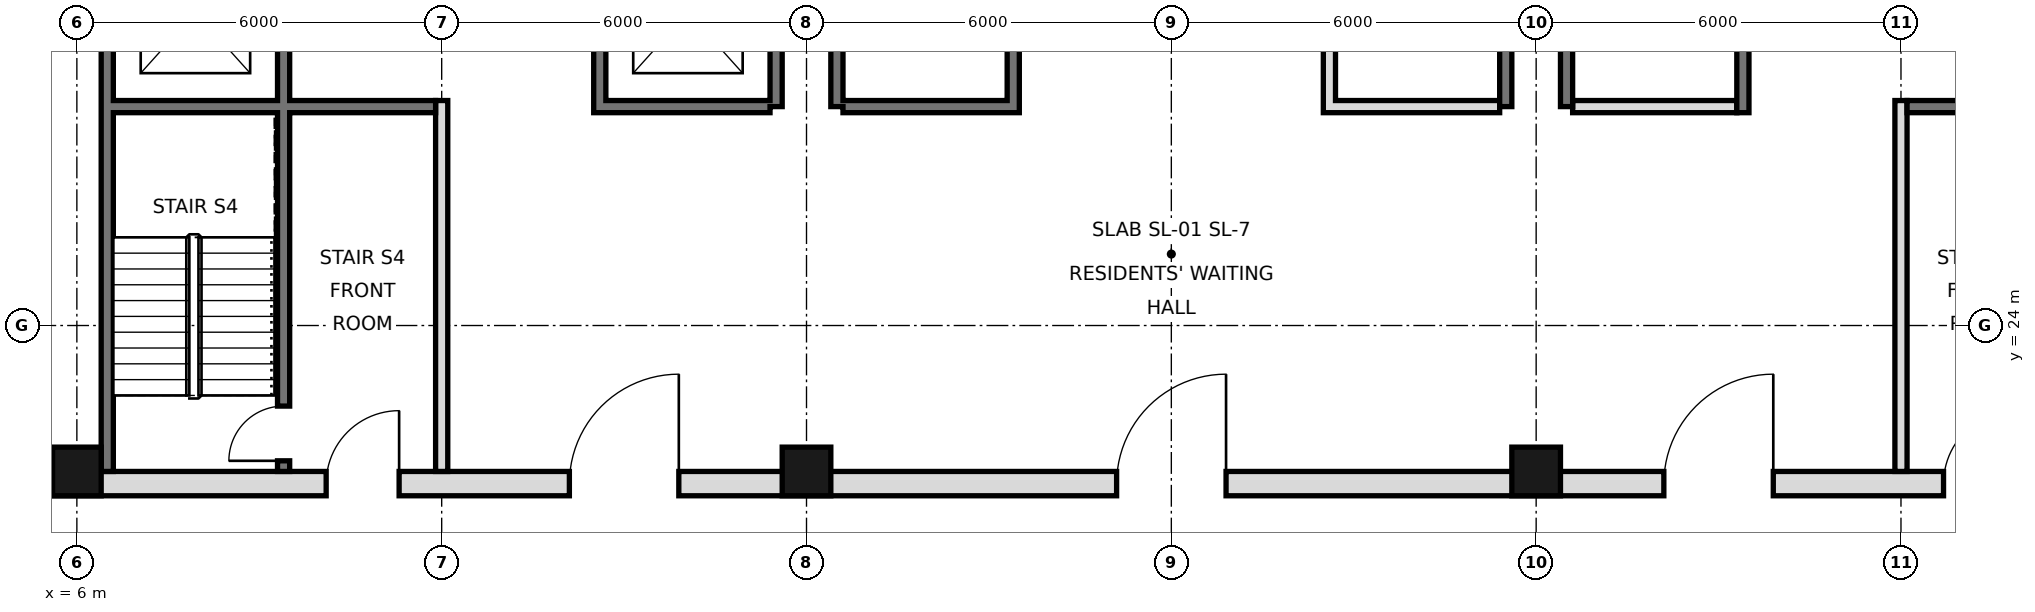
"""IFC4 building model, lengths in metres.
Left out: names, types, materials, properties, quantities, classifications, styles, units other than length and angle.
Written with IfcOpenShell. Run it as: python <this file> out.ifc"""

import sys

from ifc_helpers import new_model, si_unit, direction, frame, frame_2d, origin, origin_2d, place, context, subcontext, project, spatial, rectangle, hollow_rectangle, extrude, element, fill, save


model = new_model("IFC4")
c1 = context("Model", 3, precision=1e-05, world=origin(), true_north=direction((0.0, 1.0)))
c2 = subcontext(c1, "Body", "Model", "MODEL_VIEW")
j1 = project(units=[si_unit("LENGTHUNIT", "METRE"), si_unit("PLANEANGLEUNIT", "RADIAN")], contexts=[c1])
p1 = place(None, origin())
s1 = spatial("IfcSite", under=j1, at=p1, CompositionType="ELEMENT")
p2 = place(p1, origin())
s2 = spatial("IfcBuilding", under=s1, at=p2, CompositionType="ELEMENT")
p3 = place(p2, frame((0.0, 0.0, 154.6)))
s3 = spatial("IfcBuildingStorey", under=s2, at=p3, CompositionType="ELEMENT", Elevation=154.6)
for number, where, z_axis, x_axis in (
    (1, (6.0, 21.6, 0.0), (0.0, 0.0, 1.0), (1.0, 0.0, 0.0)),
    (2, (18.0, 21.6, 0.0), (0.0, 0.0, 1.0), (1.0, 0.0, 0.0)),
    (3, (30.0, 21.6, 0.0), (0.0, 0.0, 1.0), (1.0, 0.0, 0.0)),
):
    element("IfcColumn", number, at=place(p3, frame(where, z_axis=z_axis, x_axis=x_axis)), inside=s3, PredefinedType="COLUMN", context=c2, shape_type="SweptSolid", body=[
        extrude(hollow_rectangle(XDim=0.8, YDim=0.8, WallThickness=0.045, at=origin_2d()), origin(), (0.0, 0.0, 1.0), 3.6),
    ])
p4 = place(p3, frame((6.5, 21.6, 0.0), z_axis=(0.0, 0.0, 1.0), x_axis=(0.0, 1.0, 0.0)))
e4 = element("IfcWall", 4, at=p4, inside=s3, PredefinedType="SOLIDWALL", context=c2, shape_type="SweptSolid", body=[
    extrude(rectangle(XDim=23.5, YDim=0.2, at=frame_2d((11.75, 0.0))), origin(), (0.0, 0.0, 1.0), 3.42),
])
for number, where, z_axis, x_axis in (
    (5, (17.5, 27.6, 0.0), (0.0, 0.0, 1.0), (0.0, 1.0, 0.0)),
    (6, (18.5, 27.6, 0.0), (0.0, 0.0, 1.0), (0.0, 1.0, 0.0)),
    (7, (29.5, 27.6, 0.0), (0.0, 0.0, 1.0), (0.0, 1.0, 0.0)),
    (8, (30.5, 27.6, 0.0), (0.0, 0.0, 1.0), (0.0, 1.0, 0.0)),
):
    element("IfcWall", number, at=place(p3, frame(where, z_axis=z_axis, x_axis=x_axis)), inside=s3, PredefinedType="SOLIDWALL", context=c2, shape_type="SweptSolid", body=[
        extrude(rectangle(XDim=17.5, YDim=0.2, at=frame_2d((8.75, 0.0))), origin(), (0.0, 0.0, 1.0), 3.42),
    ])
p5 = place(p3, frame((5.6, 21.4, 0.0), z_axis=(0.0, 0.0, 1.0), x_axis=(1.0, 0.0, 0.0)))
e9 = element("IfcWall", 9, at=p5, inside=s3, PredefinedType="SOLIDWALL", context=c2, shape_type="SweptSolid", body=[
    extrude(rectangle(XDim=36.8, YDim=0.4, at=frame_2d((18.4, 0.0))), origin(), (0.0, 0.0, 1.0), 3.42),
])
p6 = place(p5, frame((8.5, 0.0, 0.0)))
e10 = element("IfcOpeningElement", 10, at=p6, cuts=e9, PredefinedType="OPENING", context=c2, shape_type="SweptSolid", body=[
    extrude(rectangle(XDim=1.8, YDim=2.1, at=frame_2d((0.9, 1.05))), frame((0.0, 0.21, 0.0), z_axis=(0.0, -1.0, 0.0), x_axis=(1.0, 0.0, 0.0)), (0.0, 0.0, 1.0), 0.42),
])
p7 = place(p5, frame((17.5, 0.0, 0.0)))
e11 = element("IfcOpeningElement", 11, at=p7, cuts=e9, PredefinedType="OPENING", context=c2, shape_type="SweptSolid", body=[
    extrude(rectangle(XDim=1.8, YDim=2.1, at=frame_2d((0.9, 1.05))), frame((0.0, 0.21, 0.0), z_axis=(0.0, -1.0, 0.0), x_axis=(1.0, 0.0, 0.0)), (0.0, 0.0, 1.0), 0.42),
])
p8 = place(p5, frame((26.5, 0.0, 0.0)))
e12 = element("IfcOpeningElement", 12, at=p8, cuts=e9, PredefinedType="OPENING", context=c2, shape_type="SweptSolid", body=[
    extrude(rectangle(XDim=1.8, YDim=2.1, at=frame_2d((0.9, 1.05))), frame((0.0, 0.21, 0.0), z_axis=(0.0, -1.0, 0.0), x_axis=(1.0, 0.0, 0.0)), (0.0, 0.0, 1.0), 0.42),
])
p9 = place(p5, frame((4.5, 0.0, 0.0)))
e13 = element("IfcOpeningElement", 13, at=p9, cuts=e9, PredefinedType="OPENING", context=c2, shape_type="SweptSolid", body=[
    extrude(rectangle(XDim=1.2, YDim=2.1, at=frame_2d((0.6, 1.05))), frame((0.0, 0.21, 0.0), z_axis=(0.0, -1.0, 0.0), x_axis=(1.0, 0.0, 0.0)), (0.0, 0.0, 1.0), 0.42),
])
p10 = place(p5, frame((31.1, 0.0, 0.0)))
e14 = element("IfcOpeningElement", 14, at=p10, cuts=e9, PredefinedType="OPENING", context=c2, shape_type="SweptSolid", body=[
    extrude(rectangle(XDim=1.2, YDim=2.1, at=frame_2d((0.6, 1.05))), frame((0.0, 0.21, 0.0), z_axis=(0.0, -1.0, 0.0), x_axis=(1.0, 0.0, 0.0)), (0.0, 0.0, 1.0), 0.42),
])
p11 = place(p3, frame((12.0, 21.6, 0.0), z_axis=(0.0, 0.0, 1.0), x_axis=(0.0, 1.0, 0.0)))
e15 = element("IfcWall", 15, at=p11, inside=s3, PredefinedType="PARTITIONING", context=c2, shape_type="SweptSolid", body=[
    extrude(rectangle(XDim=6.1, YDim=0.2, at=frame_2d((3.05, 0.0))), origin(), (0.0, 0.0, 1.0), 3.42),
])
p12 = place(p3, frame((14.6, 27.5, 0.0), z_axis=(0.0, 0.0, 1.0), x_axis=(0.0, 1.0, 0.0)))
e16 = element("IfcWall", 16, at=p12, inside=s3, PredefinedType="SOLIDWALL", context=c2, shape_type="SweptSolid", body=[
    extrude(rectangle(XDim=17.5, YDim=0.2, at=frame_2d((8.75, 0.0))), origin(), (0.0, 0.0, 1.0), 3.42),
])
p13 = place(p12, frame((1.1, 0.0, 0.0)))
e17 = element("IfcOpeningElement", 17, at=p13, cuts=e16, PredefinedType="OPENING", context=c2, shape_type="SweptSolid", body=[
    extrude(rectangle(XDim=1.1, YDim=2.1, at=frame_2d((0.55, 1.05))), frame((0.0, 0.11, 0.0), z_axis=(0.0, -1.0, 0.0), x_axis=(1.0, 0.0, 0.0)), (0.0, 0.0, 1.0), 0.22),
])
p14 = place(p12, frame((4.2, 0.0, 0.0)))
e18 = element("IfcOpeningElement", 18, at=p14, cuts=e16, PredefinedType="OPENING", context=c2, shape_type="SweptSolid", body=[
    extrude(rectangle(XDim=1.1, YDim=2.1, at=frame_2d((0.55, 1.05))), frame((0.0, 0.11, 0.0), z_axis=(0.0, -1.0, 0.0), x_axis=(1.0, 0.0, 0.0)), (0.0, 0.0, 1.0), 0.22),
])
p15 = place(p12, frame((15.4, 0.0, 0.0)))
e19 = element("IfcOpeningElement", 19, at=p15, cuts=e16, PredefinedType="OPENING", context=c2, shape_type="SweptSolid", body=[
    extrude(rectangle(XDim=1.1, YDim=2.1, at=frame_2d((0.55, 1.05))), frame((0.0, 0.11, 0.0), z_axis=(0.0, -1.0, 0.0), x_axis=(1.0, 0.0, 0.0)), (0.0, 0.0, 1.0), 0.22),
])
p16 = place(p12, frame((9.9, 0.0, 0.0)))
e20 = element("IfcOpeningElement", 20, at=p16, cuts=e16, PredefinedType="OPENING", context=c2, shape_type="SweptSolid", body=[
    extrude(rectangle(XDim=0.9, YDim=2.1, at=frame_2d((0.45, 1.05))), frame((0.0, 0.11, 0.0), z_axis=(0.0, -1.0, 0.0), x_axis=(1.0, 0.0, 0.0)), (0.0, 0.0, 1.0), 0.22),
])
p17 = place(p3, frame((21.4, 27.5, 0.0), z_axis=(0.0, 0.0, 1.0), x_axis=(0.0, 1.0, 0.0)))
e21 = element("IfcWall", 21, at=p17, inside=s3, PredefinedType="SOLIDWALL", context=c2, shape_type="SweptSolid", body=[
    extrude(rectangle(XDim=17.5, YDim=0.2, at=frame_2d((8.75, 0.0))), origin(), (0.0, 0.0, 1.0), 3.42),
])
p18 = place(p17, frame((9.8, 0.0, 0.0)))
e22 = element("IfcOpeningElement", 22, at=p18, cuts=e21, PredefinedType="OPENING", context=c2, shape_type="SweptSolid", body=[
    extrude(rectangle(XDim=1.0, YDim=2.1, at=frame_2d((0.5, 1.05))), frame((0.0, 0.11, 0.0), z_axis=(0.0, -1.0, 0.0), x_axis=(1.0, 0.0, 0.0)), (0.0, 0.0, 1.0), 0.22),
])
p19 = place(p17, frame((7.4, 0.0, 0.0)))
e23 = element("IfcOpeningElement", 23, at=p19, cuts=e21, PredefinedType="OPENING", context=c2, shape_type="SweptSolid", body=[
    extrude(rectangle(XDim=0.9, YDim=2.1, at=frame_2d((0.45, 1.05))), frame((0.0, 0.11, 0.0), z_axis=(0.0, -1.0, 0.0), x_axis=(1.0, 0.0, 0.0)), (0.0, 0.0, 1.0), 0.22),
])
p20 = place(p3, frame((26.6, 27.5, 0.0), z_axis=(0.0, 0.0, 1.0), x_axis=(0.0, 1.0, 0.0)))
e24 = element("IfcWall", 24, at=p20, inside=s3, PredefinedType="SOLIDWALL", context=c2, shape_type="SweptSolid", body=[
    extrude(rectangle(XDim=17.5, YDim=0.2, at=frame_2d((8.75, 0.0))), origin(), (0.0, 0.0, 1.0), 3.42),
])
p21 = place(p20, frame((4.3, 0.0, 0.0)))
e25 = element("IfcOpeningElement", 25, at=p21, cuts=e24, PredefinedType="OPENING", context=c2, shape_type="SweptSolid", body=[
    extrude(rectangle(XDim=0.9, YDim=2.1, at=frame_2d((0.45, 1.05))), frame((0.0, 0.11, 0.0), z_axis=(0.0, -1.0, 0.0), x_axis=(1.0, 0.0, 0.0)), (0.0, 0.0, 1.0), 0.22),
])
p22 = place(p20, frame((10.35, 0.0, 0.0)))
e26 = element("IfcOpeningElement", 26, at=p22, cuts=e24, PredefinedType="OPENING", context=c2, shape_type="SweptSolid", body=[
    extrude(rectangle(XDim=1.0, YDim=2.1, at=frame_2d((0.5, 1.05))), frame((0.0, 0.11, 0.0), z_axis=(0.0, -1.0, 0.0), x_axis=(1.0, 0.0, 0.0)), (0.0, 0.0, 1.0), 0.22),
])
p23 = place(p20, frame((14.575, 0.0, 0.0)))
e27 = element("IfcOpeningElement", 27, at=p23, cuts=e24, PredefinedType="OPENING", context=c2, shape_type="SweptSolid", body=[
    extrude(rectangle(XDim=1.0, YDim=2.1, at=frame_2d((0.5, 1.05))), frame((0.0, 0.11, 0.0), z_axis=(0.0, -1.0, 0.0), x_axis=(1.0, 0.0, 0.0)), (0.0, 0.0, 1.0), 0.22),
])
p24 = place(p3, frame((33.4, 27.5, 0.0), z_axis=(0.0, 0.0, 1.0), x_axis=(0.0, 1.0, 0.0)))
e28 = element("IfcWall", 28, at=p24, inside=s3, PredefinedType="SOLIDWALL", context=c2, shape_type="SweptSolid", body=[
    extrude(rectangle(XDim=17.5, YDim=0.2, at=frame_2d((8.75, 0.0))), origin(), (0.0, 0.0, 1.0), 3.42),
])
p25 = place(p24, frame((15.4, 0.0, 0.0)))
e29 = element("IfcOpeningElement", 29, at=p25, cuts=e28, PredefinedType="OPENING", context=c2, shape_type="SweptSolid", body=[
    extrude(rectangle(XDim=1.1, YDim=2.1, at=frame_2d((0.55, 1.05))), frame((0.0, 0.11, 0.0), z_axis=(0.0, -1.0, 0.0), x_axis=(1.0, 0.0, 0.0)), (0.0, 0.0, 1.0), 0.22),
])
p26 = place(p24, frame((2.7, 0.0, 0.0)))
e30 = element("IfcOpeningElement", 30, at=p26, cuts=e28, PredefinedType="OPENING", context=c2, shape_type="SweptSolid", body=[
    extrude(rectangle(XDim=1.0, YDim=2.1, at=frame_2d((0.5, 1.05))), frame((0.0, 0.11, 0.0), z_axis=(0.0, -1.0, 0.0), x_axis=(1.0, 0.0, 0.0)), (0.0, 0.0, 1.0), 0.22),
])
p27 = place(p24, frame((9.9, 0.0, 0.0)))
e31 = element("IfcOpeningElement", 31, at=p27, cuts=e28, PredefinedType="OPENING", context=c2, shape_type="SweptSolid", body=[
    extrude(rectangle(XDim=0.9, YDim=2.1, at=frame_2d((0.45, 1.05))), frame((0.0, 0.11, 0.0), z_axis=(0.0, -1.0, 0.0), x_axis=(1.0, 0.0, 0.0)), (0.0, 0.0, 1.0), 0.22),
])
p28 = place(p3, frame((36.0, 21.6, 0.0), z_axis=(0.0, 0.0, 1.0), x_axis=(0.0, 1.0, 0.0)))
e32 = element("IfcWall", 32, at=p28, inside=s3, PredefinedType="PARTITIONING", context=c2, shape_type="SweptSolid", body=[
    extrude(rectangle(XDim=6.1, YDim=0.2, at=frame_2d((3.05, 0.0))), origin(), (0.0, 0.0, 1.0), 3.42),
])
p29 = place(p3, frame((9.4, 21.6, 0.0), z_axis=(0.0, 0.0, 1.0), x_axis=(0.0, 1.0, 0.0)))
e33 = element("IfcWall", 33, at=p29, inside=s3, PredefinedType="SOLIDWALL", context=c2, shape_type="SweptSolid", body=[
    extrude(rectangle(XDim=23.4, YDim=0.2, at=frame_2d((11.7, 0.0))), origin(), (0.0, 0.0, 1.0), 3.42),
])
p30 = place(p29, frame((7.0, 0.0, 0.0)))
e34 = element("IfcOpeningElement", 34, at=p30, cuts=e33, PredefinedType="OPENING", context=c2, shape_type="SweptSolid", body=[
    extrude(rectangle(XDim=1.1, YDim=2.1, at=frame_2d((0.55, 1.05))), frame((0.0, 0.11, 0.0), z_axis=(0.0, -1.0, 0.0), x_axis=(1.0, 0.0, 0.0)), (0.0, 0.0, 1.0), 0.22),
])
p31 = place(p29, frame((10.1, 0.0, 0.0)))
e35 = element("IfcOpeningElement", 35, at=p31, cuts=e33, PredefinedType="OPENING", context=c2, shape_type="SweptSolid", body=[
    extrude(rectangle(XDim=1.1, YDim=2.1, at=frame_2d((0.55, 1.05))), frame((0.0, 0.11, 0.0), z_axis=(0.0, -1.0, 0.0), x_axis=(1.0, 0.0, 0.0)), (0.0, 0.0, 1.0), 0.22),
])
p32 = place(p29, frame((13.2, 0.0, 0.0)))
e36 = element("IfcOpeningElement", 36, at=p32, cuts=e33, PredefinedType="OPENING", context=c2, shape_type="SweptSolid", body=[
    extrude(rectangle(XDim=1.1, YDim=2.1, at=frame_2d((0.55, 1.05))), frame((0.0, 0.11, 0.0), z_axis=(0.0, -1.0, 0.0), x_axis=(1.0, 0.0, 0.0)), (0.0, 0.0, 1.0), 0.22),
])
p33 = place(p29, frame((15.7, 0.0, 0.0)))
e37 = element("IfcOpeningElement", 37, at=p33, cuts=e33, PredefinedType="OPENING", context=c2, shape_type="SweptSolid", body=[
    extrude(rectangle(XDim=1.0, YDim=2.1, at=frame_2d((0.5, 1.05))), frame((0.0, 0.11, 0.0), z_axis=(0.0, -1.0, 0.0), x_axis=(1.0, 0.0, 0.0)), (0.0, 0.0, 1.0), 0.22),
])
p34 = place(p29, frame((0.175, 0.0, 0.0)))
e38 = element("IfcOpeningElement", 38, at=p34, cuts=e33, PredefinedType="OPENING", context=c2, shape_type="SweptSolid", body=[
    extrude(rectangle(XDim=0.9, YDim=2.1, at=frame_2d((0.45, 1.05))), frame((0.0, 0.11, 0.0), z_axis=(0.0, -1.0, 0.0), x_axis=(1.0, 0.0, 0.0)), (0.0, 0.0, 1.0), 0.22),
])
for number, where, z_axis, x_axis in (
    (39, (14.7, 27.6, 0.0), (0.0, 0.0, 1.0), (1.0, 0.0, 0.0)),
    (40, (18.6, 27.6, 0.0), (0.0, 0.0, 1.0), (1.0, 0.0, 0.0)),
    (41, (26.7, 27.6, 0.0), (0.0, 0.0, 1.0), (1.0, 0.0, 0.0)),
):
    element("IfcWall", number, at=place(p3, frame(where, z_axis=z_axis, x_axis=x_axis)), inside=s3, PredefinedType="SOLIDWALL", context=c2, shape_type="SweptSolid", body=[
        extrude(rectangle(XDim=2.7, YDim=0.2, at=frame_2d((1.35, 0.0))), origin(), (0.0, 0.0, 1.0), 3.42),
    ])
p35 = place(p3, frame((30.6, 27.6, 0.0), z_axis=(0.0, 0.0, 1.0), x_axis=(1.0, 0.0, 0.0)))
e42 = element("IfcWall", 42, at=p35, inside=s3, PredefinedType="PARTITIONING", context=c2, shape_type="SweptSolid", body=[
    extrude(rectangle(XDim=2.7, YDim=0.2, at=frame_2d((1.35, 0.0))), origin(), (0.0, 0.0, 1.0), 3.42),
])
for number, where, z_axis, x_axis in (
    (43, (36.1, 27.6, 0.0), (0.0, 0.0, 1.0), (1.0, 0.0, 0.0)),
    (44, (6.6, 27.6, 0.0), (0.0, 0.0, 1.0), (1.0, 0.0, 0.0)),
):
    element("IfcWall", number, at=place(p3, frame(where, z_axis=z_axis, x_axis=x_axis)), inside=s3, PredefinedType="SOLIDWALL", context=c2, shape_type="SweptSolid", body=[
        extrude(rectangle(XDim=5.3, YDim=0.2, at=frame_2d((2.65, 0.0))), origin(), (0.0, 0.0, 1.0), 3.42),
    ])
p36 = place(p6, frame((1.8, 0.0, 0.0), z_axis=(0.0, 0.0, 1.0), x_axis=(-1.0, 0.0, 0.0)))
e45 = element("IfcDoor", 45, at=p36, inside=s3, OperationType="SINGLE_SWING_LEFT", PredefinedType="DOOR", context=c2, shape_type="SweptSolid", body=[
    extrude(rectangle(XDim=1.8, YDim=2.1, at=frame_2d((0.9, 1.05))), frame((0.0, 0.025, 0.0), z_axis=(0.0, -1.0, 0.0), x_axis=(1.0, 0.0, 0.0)), (0.0, 0.0, 1.0), 0.05),
])
fill(e10, e45)
p37 = place(p7, frame((1.8, 0.0, 0.0), z_axis=(0.0, 0.0, 1.0), x_axis=(-1.0, 0.0, 0.0)))
e46 = element("IfcDoor", 46, at=p37, inside=s3, OperationType="SINGLE_SWING_LEFT", PredefinedType="DOOR", context=c2, shape_type="SweptSolid", body=[
    extrude(rectangle(XDim=1.8, YDim=2.1, at=frame_2d((0.9, 1.05))), frame((0.0, 0.025, 0.0), z_axis=(0.0, -1.0, 0.0), x_axis=(1.0, 0.0, 0.0)), (0.0, 0.0, 1.0), 0.05),
])
fill(e11, e46)
p38 = place(p8, frame((1.8, 0.0, 0.0), z_axis=(0.0, 0.0, 1.0), x_axis=(-1.0, 0.0, 0.0)))
e47 = element("IfcDoor", 47, at=p38, inside=s3, OperationType="SINGLE_SWING_LEFT", PredefinedType="DOOR", context=c2, shape_type="SweptSolid", body=[
    extrude(rectangle(XDim=1.8, YDim=2.1, at=frame_2d((0.9, 1.05))), frame((0.0, 0.025, 0.0), z_axis=(0.0, -1.0, 0.0), x_axis=(1.0, 0.0, 0.0)), (0.0, 0.0, 1.0), 0.05),
])
fill(e12, e47)
p39 = place(p9, frame((1.2, 0.0, 0.0), z_axis=(0.0, 0.0, 1.0), x_axis=(-1.0, 0.0, 0.0)))
e48 = element("IfcDoor", 48, at=p39, inside=s3, OperationType="SINGLE_SWING_LEFT", PredefinedType="DOOR", context=c2, shape_type="SweptSolid", body=[
    extrude(rectangle(XDim=1.2, YDim=2.1, at=frame_2d((0.6, 1.05))), frame((0.0, 0.025, 0.0), z_axis=(0.0, -1.0, 0.0), x_axis=(1.0, 0.0, 0.0)), (0.0, 0.0, 1.0), 0.05),
])
fill(e13, e48)
p40 = place(p10, frame((1.2, 0.0, 0.0), z_axis=(0.0, 0.0, 1.0), x_axis=(-1.0, 0.0, 0.0)))
e49 = element("IfcDoor", 49, at=p40, inside=s3, OperationType="SINGLE_SWING_LEFT", PredefinedType="DOOR", context=c2, shape_type="SweptSolid", body=[
    extrude(rectangle(XDim=1.2, YDim=2.1, at=frame_2d((0.6, 1.05))), frame((0.0, 0.025, 0.0), z_axis=(0.0, -1.0, 0.0), x_axis=(1.0, 0.0, 0.0)), (0.0, 0.0, 1.0), 0.05),
])
fill(e14, e49)
p41 = place(p34, origin())
e50 = element("IfcDoor", 50, at=p41, inside=s3, OperationType="SINGLE_SWING_LEFT", PredefinedType="DOOR", context=c2, shape_type="SweptSolid", body=[
    extrude(rectangle(XDim=0.9, YDim=2.1, at=frame_2d((0.45, 1.05))), frame((0.0, 0.025, 0.0), z_axis=(0.0, -1.0, 0.0), x_axis=(1.0, 0.0, 0.0)), (0.0, 0.0, 1.0), 0.05),
])
fill(e38, e50)
save(model, sys.argv[1])
